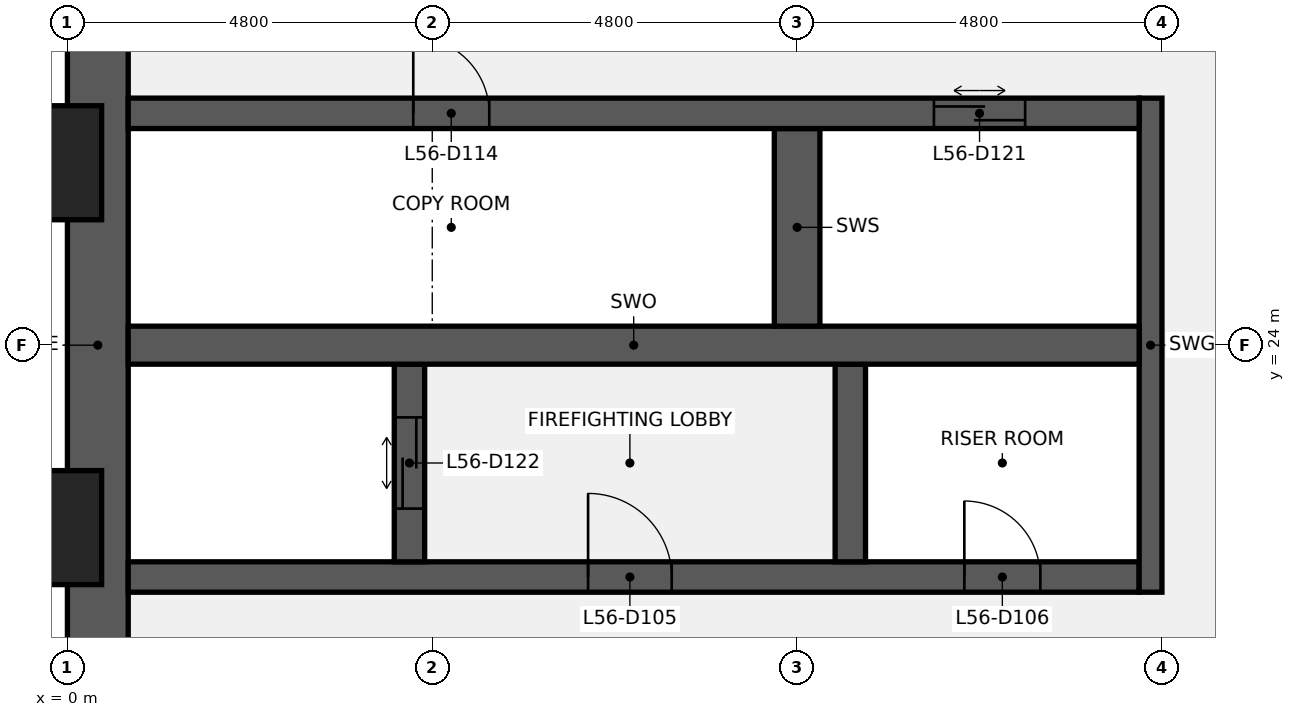
"""IFC4 building model, lengths in metres.
Left out: names, types, materials, properties, quantities, classifications, styles, units other than length and angle.
Written with IfcOpenShell. Run it as: python <this file> out.ifc"""

import sys

from ifc_helpers import new_model, si_unit, direction, frame, frame_2d, origin, origin_2d, place, context, subcontext, project, spatial, rectangle, extrude, element, fill, save


model = new_model("IFC4")
c1 = context("Model", 3, precision=1e-05, world=origin(), true_north=direction((0.0, 1.0)))
c2 = subcontext(c1, "Body", "Model", "MODEL_VIEW")
j1 = project(units=[si_unit("LENGTHUNIT", "METRE"), si_unit("PLANEANGLEUNIT", "RADIAN")], contexts=[c1])
p1 = place(None, origin())
s1 = spatial("IfcSite", under=j1, at=p1, CompositionType="ELEMENT")
p2 = place(p1, origin())
s2 = spatial("IfcBuilding", under=s1, at=p2, CompositionType="ELEMENT")
p3 = place(p2, frame((0.0, 0.0, 253.2)))
s3 = spatial("IfcBuildingStorey", under=s2, at=p3, CompositionType="ELEMENT", Elevation=253.2)
p4 = place(p3, frame((0.4, 9.6, 0.0), z_axis=(0.0, 0.0, 1.0), x_axis=(0.0, 1.0, 0.0)))
e1 = element("IfcWall", 1, at=p4, inside=s3, PredefinedType="SHEAR", context=c2, shape_type="SweptSolid", body=[
    extrude(rectangle(XDim=28.8, YDim=0.8, at=frame_2d((14.4, 0.0))), origin(), (0.0, 0.0, 1.0), 3.84),
])
p5 = place(p4, frame((8.85, 0.0, 0.9)))
e2 = element("IfcOpeningElement", 2, at=p5, cuts=e1, PredefinedType="OPENING", context=c2, shape_type="SweptSolid", body=[
    extrude(rectangle(XDim=1.5, YDim=1.5, at=frame_2d((0.75, 0.75))), frame((0.0, 0.41, 0.0), z_axis=(0.0, -1.0, 0.0), x_axis=(1.0, 0.0, 0.0)), (0.0, 0.0, 1.0), 0.82),
])
p6 = place(p4, frame((18.45, 0.0, 0.9)))
e3 = element("IfcOpeningElement", 3, at=p6, cuts=e1, PredefinedType="OPENING", context=c2, shape_type="SweptSolid", body=[
    extrude(rectangle(XDim=1.5, YDim=1.5, at=frame_2d((0.75, 0.75))), frame((0.0, 0.41, 0.0), z_axis=(0.0, -1.0, 0.0), x_axis=(1.0, 0.0, 0.0)), (0.0, 0.0, 1.0), 0.82),
])
p7 = place(p3, frame((0.8, 20.95, 0.0), z_axis=(0.0, 0.0, 1.0), x_axis=(1.0, 0.0, 0.0)))
e4 = element("IfcWall", 4, at=p7, inside=s3, PredefinedType="SHEAR", context=c2, shape_type="SweptSolid", body=[
    extrude(rectangle(XDim=13.3, YDim=0.4, at=frame_2d((6.65, 0.0))), origin(), (0.0, 0.0, 1.0), 3.84),
])
p8 = place(p7, frame((6.05, 0.0, 0.0)))
e5 = element("IfcOpeningElement", 5, at=p8, cuts=e4, PredefinedType="OPENING", context=c2, shape_type="SweptSolid", body=[
    extrude(rectangle(XDim=1.1, YDim=2.1, at=frame_2d((0.55, 1.05))), frame((0.0, 0.21, 0.0), z_axis=(0.0, -1.0, 0.0), x_axis=(1.0, 0.0, 0.0)), (0.0, 0.0, 1.0), 0.42),
])
p9 = place(p7, frame((11.0, 0.0, 0.0)))
e6 = element("IfcOpeningElement", 6, at=p9, cuts=e4, PredefinedType="OPENING", context=c2, shape_type="SweptSolid", body=[
    extrude(rectangle(XDim=1.0, YDim=2.1, at=frame_2d((0.5, 1.05))), frame((0.0, 0.21, 0.0), z_axis=(0.0, -1.0, 0.0), x_axis=(1.0, 0.0, 0.0)), (0.0, 0.0, 1.0), 0.42),
])
p10 = place(p3, frame((14.25, 20.75, 0.0), z_axis=(0.0, 0.0, 1.0), x_axis=(0.0, 1.0, 0.0)))
e7 = element("IfcWall", 7, at=p10, inside=s3, PredefinedType="SHEAR", context=c2, shape_type="SweptSolid", body=[
    extrude(rectangle(XDim=6.5, YDim=0.3, at=frame_2d((3.25, 0.0))), origin(), (0.0, 0.0, 1.0), 3.84),
])
p11 = place(p3, frame((4.5, 21.15, 0.0), z_axis=(0.0, 0.0, 1.0), x_axis=(0.0, 1.0, 0.0)))
e8 = element("IfcWall", 8, at=p11, inside=s3, PredefinedType="SHEAR", context=c2, shape_type="SweptSolid", body=[
    extrude(rectangle(XDim=2.6, YDim=0.4, at=frame_2d((1.3, 0.0))), origin(), (0.0, 0.0, 1.0), 3.84),
])
p12 = place(p11, frame((0.7, 0.0, 0.0)))
e9 = element("IfcOpeningElement", 9, at=p12, cuts=e8, PredefinedType="OPENING", context=c2, shape_type="SweptSolid", body=[
    extrude(rectangle(XDim=1.2, YDim=2.1, at=frame_2d((0.6, 1.05))), frame((0.0, 0.21, 0.0), z_axis=(0.0, -1.0, 0.0), x_axis=(1.0, 0.0, 0.0)), (0.0, 0.0, 1.0), 0.42),
])
p13 = place(p3, frame((10.3, 21.15, 0.0), z_axis=(0.0, 0.0, 1.0), x_axis=(0.0, 1.0, 0.0)))
e10 = element("IfcWall", 10, at=p13, inside=s3, PredefinedType="SHEAR", context=c2, shape_type="SweptSolid", body=[
    extrude(rectangle(XDim=2.6, YDim=0.4, at=frame_2d((1.3, 0.0))), origin(), (0.0, 0.0, 1.0), 3.84),
])
p14 = place(p3, frame((0.8, 24.0, 0.0), z_axis=(0.0, 0.0, 1.0), x_axis=(1.0, 0.0, 0.0)))
e11 = element("IfcWall", 11, at=p14, inside=s3, PredefinedType="SHEAR", context=c2, shape_type="SweptSolid", body=[
    extrude(rectangle(XDim=13.3, YDim=0.5, at=frame_2d((6.65, 0.0))), origin(), (0.0, 0.0, 1.0), 3.84),
])
p15 = place(p3, frame((9.6, 24.25, 0.0), z_axis=(0.0, 0.0, 1.0), x_axis=(0.0, 1.0, 0.0)))
e12 = element("IfcWall", 12, at=p15, inside=s3, PredefinedType="SHEAR", context=c2, shape_type="SweptSolid", body=[
    extrude(rectangle(XDim=2.6, YDim=0.6, at=frame_2d((1.3, 0.0))), origin(), (0.0, 0.0, 1.0), 3.84),
])
p16 = place(p3, frame((0.8, 27.05, 0.0), z_axis=(0.0, 0.0, 1.0), x_axis=(1.0, 0.0, 0.0)))
e13 = element("IfcWall", 13, at=p16, inside=s3, PredefinedType="SHEAR", context=c2, shape_type="SweptSolid", body=[
    extrude(rectangle(XDim=13.3, YDim=0.4, at=frame_2d((6.65, 0.0))), origin(), (0.0, 0.0, 1.0), 3.84),
])
p17 = place(p16, frame((3.75, 0.0, 0.0)))
e14 = element("IfcOpeningElement", 14, at=p17, cuts=e13, PredefinedType="OPENING", context=c2, shape_type="SweptSolid", body=[
    extrude(rectangle(XDim=1.0, YDim=2.1, at=frame_2d((0.5, 1.05))), frame((0.0, 0.21, 0.0), z_axis=(0.0, -1.0, 0.0), x_axis=(1.0, 0.0, 0.0)), (0.0, 0.0, 1.0), 0.42),
])
p18 = place(p16, frame((10.6, 0.0, 0.0)))
e15 = element("IfcOpeningElement", 15, at=p18, cuts=e13, PredefinedType="OPENING", context=c2, shape_type="SweptSolid", body=[
    extrude(rectangle(XDim=1.2, YDim=2.1, at=frame_2d((0.6, 1.05))), frame((0.0, 0.21, 0.0), z_axis=(0.0, -1.0, 0.0), x_axis=(1.0, 0.0, 0.0)), (0.0, 0.0, 1.0), 0.42),
])
for number, where, z_axis, x_axis in (
    (16, (-0.75, 21.6, 0.0), (0.0, 0.0, 1.0), (0.0, 1.0, 0.0)),
    (17, (-0.75, 26.4, 0.0), (0.0, 0.0, 1.0), (0.0, 1.0, 0.0)),
):
    element("IfcColumn", number, at=place(p3, frame(where, z_axis=z_axis, x_axis=x_axis)), inside=s3, PredefinedType="PILASTER", context=c2, shape_type="SweptSolid", body=[
        extrude(rectangle(XDim=2.4, YDim=1.5, at=origin_2d()), origin(), (0.0, 0.0, 1.0), 4.0),
    ])
p19 = place(p8, origin())
e18 = element("IfcDoor", 18, at=p19, inside=s3, OperationType="SINGLE_SWING_LEFT", PredefinedType="DOOR", context=c2, shape_type="SweptSolid", body=[
    extrude(rectangle(XDim=1.1, YDim=2.1, at=frame_2d((0.55, 1.05))), frame((0.0, 0.025, 0.0), z_axis=(0.0, -1.0, 0.0), x_axis=(1.0, 0.0, 0.0)), (0.0, 0.0, 1.0), 0.05),
])
fill(e5, e18)
p20 = place(p9, origin())
e19 = element("IfcDoor", 19, at=p20, inside=s3, OperationType="SINGLE_SWING_LEFT", PredefinedType="DOOR", context=c2, shape_type="SweptSolid", body=[
    extrude(rectangle(XDim=1.0, YDim=2.1, at=frame_2d((0.5, 1.05))), frame((0.0, 0.025, 0.0), z_axis=(0.0, -1.0, 0.0), x_axis=(1.0, 0.0, 0.0)), (0.0, 0.0, 1.0), 0.05),
])
fill(e6, e19)
p21 = place(p17, origin())
e20 = element("IfcDoor", 20, at=p21, inside=s3, OperationType="SINGLE_SWING_LEFT", PredefinedType="DOOR", context=c2, shape_type="SweptSolid", body=[
    extrude(rectangle(XDim=1.0, YDim=2.1, at=frame_2d((0.5, 1.05))), frame((0.0, 0.025, 0.0), z_axis=(0.0, -1.0, 0.0), x_axis=(1.0, 0.0, 0.0)), (0.0, 0.0, 1.0), 0.05),
])
fill(e14, e20)
p22 = place(p18, origin())
e21 = element("IfcDoor", 21, at=p22, inside=s3, OperationType="DOUBLE_DOOR_SLIDING", PredefinedType="DOOR", context=c2, shape_type="SweptSolid", body=[
    extrude(rectangle(XDim=1.2, YDim=2.1, at=frame_2d((0.6, 1.05))), frame((0.0, 0.025, 0.0), z_axis=(0.0, -1.0, 0.0), x_axis=(1.0, 0.0, 0.0)), (0.0, 0.0, 1.0), 0.05),
])
fill(e15, e21)
p23 = place(p12, origin())
e22 = element("IfcDoor", 22, at=p23, inside=s3, OperationType="DOUBLE_DOOR_SLIDING", PredefinedType="DOOR", context=c2, shape_type="SweptSolid", body=[
    extrude(rectangle(XDim=1.2, YDim=2.1, at=frame_2d((0.6, 1.05))), frame((0.0, 0.025, 0.0), z_axis=(0.0, -1.0, 0.0), x_axis=(1.0, 0.0, 0.0)), (0.0, 0.0, 1.0), 0.05),
])
fill(e9, e22)
save(model, sys.argv[1])
